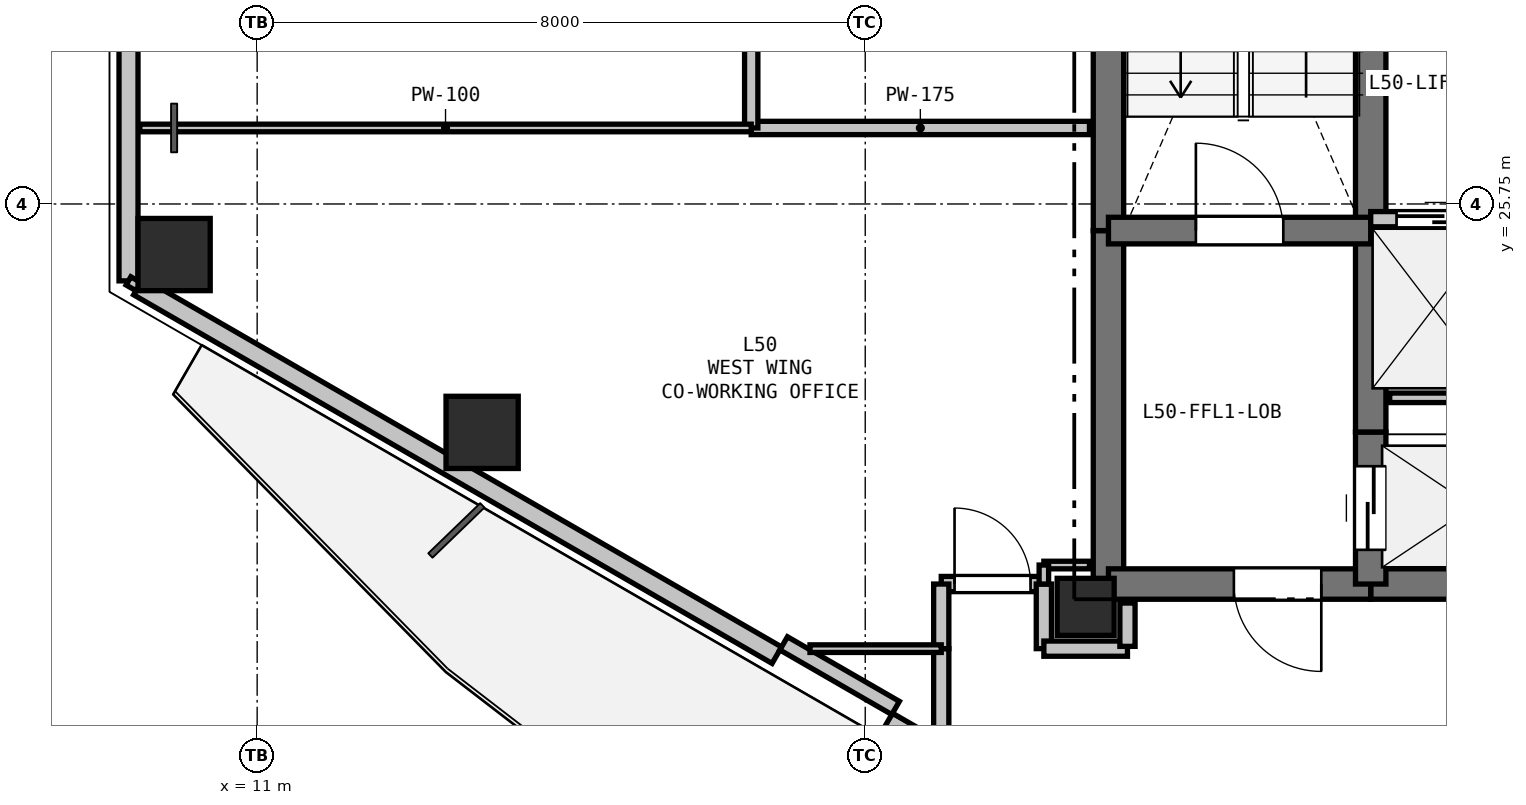
"""IFC4 building model, lengths in metres.
Left out: names, types, materials, properties, quantities, classifications, styles, units other than length and angle.
Written with IfcOpenShell. Run it as: python <this file> out.ifc"""

import sys

from ifc_helpers import new_model, si_unit, direction, frame, frame_2d, origin, origin_2d, place, context, subcontext, project, spatial, rectangle, hollow_rectangle, extrude, element, fill, save


model = new_model("IFC4")
c1 = context("Model", 3, precision=1e-05, world=origin(), true_north=direction((0.0, 1.0)))
c2 = subcontext(c1, "Body", "Model", "MODEL_VIEW")
j1 = project(units=[si_unit("LENGTHUNIT", "METRE"), si_unit("PLANEANGLEUNIT", "RADIAN")], contexts=[c1])
p1 = place(None, origin())
s1 = spatial("IfcSite", under=j1, at=p1, CompositionType="ELEMENT")
p2 = place(p1, origin())
s2 = spatial("IfcBuilding", under=s1, at=p2, CompositionType="ELEMENT")
p3 = place(p2, frame((0.0, 0.0, 182.1)))
s3 = spatial("IfcBuildingStorey", under=s2, at=p3, CompositionType="ELEMENT", Elevation=182.1)
p4 = place(p3, frame((21.9, 20.45, 0.0), z_axis=(0.0, 0.0, 1.0), x_axis=(1.0, 0.0, 0.0)))
e1 = element("IfcColumn", 1, at=p4, inside=s3, PredefinedType="COLUMN", context=c2, shape_type="SweptSolid", body=[
    extrude(rectangle(XDim=0.75, YDim=0.75, at=origin_2d()), origin(), (0.0, 0.0, 1.0), 3.3),
])
for number, where, z_axis, x_axis in (
    (2, (13.96, 22.745, 0.0), (0.0, 0.0, 1.0), (1.0, 0.0, 0.0)),
    (3, (9.907, 25.085, 0.0), (0.0, 0.0, 1.0), (1.0, 0.0, 0.0)),
):
    element("IfcColumn", number, at=place(p3, frame(where, z_axis=z_axis, x_axis=x_axis)), inside=s3, PredefinedType="COLUMN", context=c2, shape_type="SweptSolid", body=[
        extrude(hollow_rectangle(XDim=0.95, YDim=0.95, WallThickness=0.028, at=origin_2d()), origin(), (0.0, 0.0, 1.0), 3.3),
    ])
p5 = place(p3, frame((9.308, 24.738, 0.0), z_axis=(0.0, 0.0, 1.0), x_axis=(0.0, 1.0, 0.0)))
e4 = element("IfcWall", 4, at=p5, inside=s3, PredefinedType="SOLIDWALL", context=c2, shape_type="SweptSolid", body=[
    extrude(rectangle(XDim=4.023, YDim=0.25, at=frame_2d((2.012, 0.0))), origin(), (0.0, 0.0, 1.0), 2.69),
])
p6 = place(p3, frame((27.102, 14.464, 0.0), z_axis=(0.0, 0.0, 1.0), x_axis=(-0.866020680503, 0.500008180874, 0.0)))
e5 = element("IfcWall", 5, at=p6, inside=s3, PredefinedType="PARAPET", context=c2, shape_type="SweptSolid", body=[
    extrude(rectangle(XDim=8.999, YDim=0.2, at=frame_2d((4.5, 0.0))), origin(), (0.0, 0.0, 1.0), 0.2),
])
p7 = place(p3, frame((17.837, 19.814, 0.0), z_axis=(0.0, 0.0, 1.0), x_axis=(-0.866027133173, 0.499997004599, 0.0)))
e6 = element("IfcWall", 6, at=p7, inside=s3, PredefinedType="SOLIDWALL", context=c2, shape_type="SweptSolid", body=[
    extrude(rectangle(XDim=9.699, YDim=0.25, at=frame_2d((4.849, 0.0))), origin(), (0.0, 0.0, 1.0), 2.69),
])
p8 = place(p3, frame((19.399, 19.12, 0.0), z_axis=(0.0, 0.0, 1.0), x_axis=(-0.86605165483, 0.499954529098, 0.0)))
e7 = element("IfcWall", 7, at=p8, inside=s3, PredefinedType="PARAPET", context=c2, shape_type="SweptSolid", body=[
    extrude(rectangle(XDim=1.7, YDim=0.2, at=frame_2d((0.85, 0.0))), origin(), (0.0, 0.0, 1.0), 2.69),
])
p9 = place(p3, frame((22.2, 20.75, 0.0), z_axis=(0.0, 0.0, 1.0), x_axis=(0.0, 1.0, 0.0)))
e8 = element("IfcWall", 8, at=p9, inside=s3, PredefinedType="SHEAR", context=c2, shape_type="SweptSolid", body=[
    extrude(rectangle(XDim=4.65, YDim=0.4, at=frame_2d((2.325, 0.0))), origin(), (0.0, 0.0, 1.0), 3.07),
])
p10 = place(p3, frame((22.2, 25.4, 0.0), z_axis=(0.0, 0.0, 1.0), x_axis=(0.0, 1.0, 0.0)))
e9 = element("IfcWall", 9, at=p10, inside=s3, PredefinedType="SHEAR", context=c2, shape_type="SweptSolid", body=[
    extrude(rectangle(XDim=7.35, YDim=0.4, at=frame_2d((3.675, 0.0))), origin(), (0.0, 0.0, 1.0), 3.07),
])
p11 = place(p3, frame((28.35, 20.75, 0.0), z_axis=(0.0, 0.0, 1.0), x_axis=(-1.0, 0.0, 0.0)))
e10 = element("IfcWall", 10, at=p11, inside=s3, PredefinedType="SHEAR", context=c2, shape_type="SweptSolid", body=[
    extrude(rectangle(XDim=2.7, YDim=0.4, at=frame_2d((1.35, 0.0))), origin(), (0.0, 0.0, 1.0), 3.07),
])
p12 = place(p3, frame((25.65, 20.75, 0.0), z_axis=(0.0, 0.0, 1.0), x_axis=(-1.0, 0.0, 0.0)))
e11 = element("IfcWall", 11, at=p12, inside=s3, PredefinedType="SHEAR", context=c2, shape_type="SweptSolid", body=[
    extrude(rectangle(XDim=3.45, YDim=0.4, at=frame_2d((1.725, 0.0))), origin(), (0.0, 0.0, 1.0), 3.07),
])
p13 = place(p12, frame((0.65, 0.0, 0.0)))
e12 = element("IfcOpeningElement", 12, at=p13, cuts=e11, PredefinedType="OPENING", context=c2, shape_type="SweptSolid", body=[
    extrude(rectangle(XDim=1.15, YDim=2.15, at=frame_2d((0.575, 1.075))), frame((0.0, 0.21, 0.0), z_axis=(0.0, -1.0, 0.0), x_axis=(1.0, 0.0, 0.0)), (0.0, 0.0, 1.0), 0.42),
])
p14 = place(p3, frame((25.65, 20.75, 0.0), z_axis=(0.0, 0.0, 1.0), x_axis=(0.0, 1.0, 0.0)))
e13 = element("IfcWall", 13, at=p14, inside=s3, PredefinedType="SHEAR", context=c2, shape_type="SweptSolid", body=[
    extrude(rectangle(XDim=2.0, YDim=0.4, at=frame_2d((1.0, 0.0))), origin(), (0.0, 0.0, 1.0), 3.07),
])
p15 = place(p14, frame((0.45, 0.0, 0.0)))
e14 = element("IfcOpeningElement", 14, at=p15, cuts=e13, PredefinedType="OPENING", context=c2, shape_type="SweptSolid", body=[
    extrude(rectangle(XDim=1.1, YDim=2.15, at=frame_2d((0.55, 1.075))), frame((0.0, 0.21, 0.0), z_axis=(0.0, -1.0, 0.0), x_axis=(1.0, 0.0, 0.0)), (0.0, 0.0, 1.0), 0.42),
])
p16 = place(p3, frame((25.65, 22.75, 0.0), z_axis=(0.0, 0.0, 1.0), x_axis=(0.0, 1.0, 0.0)))
e15 = element("IfcWall", 15, at=p16, inside=s3, PredefinedType="SHEAR", context=c2, shape_type="SweptSolid", body=[
    extrude(rectangle(XDim=2.8, YDim=0.4, at=frame_2d((1.4, 0.0))), origin(), (0.0, 0.0, 1.0), 3.07),
])
p17 = place(p3, frame((25.65, 25.55, 0.0), z_axis=(0.0, 0.0, 1.0), x_axis=(0.0, 1.0, 0.0)))
e16 = element("IfcWall", 16, at=p17, inside=s3, PredefinedType="SHEAR", context=c2, shape_type="SweptSolid", body=[
    extrude(rectangle(XDim=2.4, YDim=0.4, at=frame_2d((1.2, 0.0))), origin(), (0.0, 0.0, 1.0), 3.07),
])
p18 = place(p3, frame((22.2, 25.4, 0.0), z_axis=(0.0, 0.0, 1.0), x_axis=(1.0, 0.0, 0.0)))
e17 = element("IfcWall", 17, at=p18, inside=s3, PredefinedType="SHEAR", context=c2, shape_type="SweptSolid", body=[
    extrude(rectangle(XDim=3.45, YDim=0.35, at=frame_2d((1.725, 0.0))), origin(), (0.0, 0.0, 1.0), 3.07),
])
p19 = place(p18, frame((1.15, 0.0, 0.0)))
e18 = element("IfcOpeningElement", 18, at=p19, cuts=e17, PredefinedType="OPENING", context=c2, shape_type="SweptSolid", body=[
    extrude(rectangle(XDim=1.15, YDim=2.15, at=frame_2d((0.575, 1.075))), frame((0.0, 0.185, 0.0), z_axis=(0.0, -1.0, 0.0), x_axis=(1.0, 0.0, 0.0)), (0.0, 0.0, 1.0), 0.37),
])
p20 = place(p3, frame((25.65, 25.55, 0.0), z_axis=(0.0, 0.0, 1.0), x_axis=(1.0, 0.0, 0.0)))
e19 = element("IfcWall", 19, at=p20, inside=s3, PredefinedType="PARTITIONING", context=c2, shape_type="SweptSolid", body=[
    extrude(rectangle(XDim=4.95, YDim=0.2, at=frame_2d((2.475, 0.0))), origin(), (0.0, 0.0, 1.0), 3.07),
])
p21 = place(p20, frame((0.34, 0.0, 0.0)))
e20 = element("IfcOpeningElement", 20, at=p21, cuts=e19, PredefinedType="OPENING", context=c2, shape_type="SweptSolid", body=[
    extrude(rectangle(XDim=1.1, YDim=2.15, at=frame_2d((0.55, 1.075))), frame((0.0, 0.11, 0.0), z_axis=(0.0, -1.0, 0.0), x_axis=(1.0, 0.0, 0.0)), (0.0, 0.0, 1.0), 0.22),
])
p22 = place(p20, frame((1.99, 0.0, 0.0)))
e21 = element("IfcOpeningElement", 21, at=p22, cuts=e19, PredefinedType="OPENING", context=c2, shape_type="SweptSolid", body=[
    extrude(rectangle(XDim=1.1, YDim=2.15, at=frame_2d((0.55, 1.075))), frame((0.0, 0.11, 0.0), z_axis=(0.0, -1.0, 0.0), x_axis=(1.0, 0.0, 0.0)), (0.0, 0.0, 1.0), 0.22),
])
p23 = place(p20, frame((3.64, 0.0, 0.0)))
e22 = element("IfcOpeningElement", 22, at=p23, cuts=e19, PredefinedType="OPENING", context=c2, shape_type="SweptSolid", body=[
    extrude(rectangle(XDim=1.1, YDim=2.15, at=frame_2d((0.55, 1.075))), frame((0.0, 0.11, 0.0), z_axis=(0.0, -1.0, 0.0), x_axis=(1.0, 0.0, 0.0)), (0.0, 0.0, 1.0), 0.22),
])
p24 = place(p3, frame((25.9, 23.2, 0.0), z_axis=(0.0, 0.0, 1.0), x_axis=(1.0, 0.0, 0.0)))
e23 = element("IfcWall", 23, at=p24, inside=s3, PredefinedType="PARTITIONING", context=c2, shape_type="SweptSolid", body=[
    extrude(rectangle(XDim=1.4, YDim=0.125, at=frame_2d((0.7, 0.0))), origin(), (0.0, 0.0, 1.0), 3.07),
])
p25 = place(p3, frame((20.0, 20.75, 0.0), z_axis=(0.0, 0.0, 1.0), x_axis=(1.0, 0.0, 0.0)))
e24 = element("IfcWall", 24, at=p25, inside=s3, PredefinedType="PARTITIONING", context=c2, shape_type="SweptSolid", body=[
    extrude(rectangle(XDim=1.35, YDim=0.2, at=frame_2d((0.675, 0.0))), origin(), (0.0, 0.0, 1.0), 2.518),
])
p26 = place(p25, frame((0.175, 0.0, 0.0)))
e25 = element("IfcOpeningElement", 25, at=p26, cuts=e24, PredefinedType="OPENING", context=c2, shape_type="SweptSolid", body=[
    extrude(rectangle(XDim=1.0, YDim=2.15, at=frame_2d((0.5, 1.075))), frame((0.0, 0.11, 0.0), z_axis=(0.0, -1.0, 0.0), x_axis=(1.0, 0.0, 0.0)), (0.0, 0.0, 1.0), 0.22),
])
p27 = place(p3, frame((21.35, 20.75, 0.0), z_axis=(0.0, 0.0, 1.0), x_axis=(0.0, -1.0, 0.0)))
e26 = element("IfcWall", 26, at=p27, inside=s3, PredefinedType="PARTITIONING", context=c2, shape_type="SweptSolid", body=[
    extrude(rectangle(XDim=0.85, YDim=0.2, at=frame_2d((0.425, 0.0))), origin(), (0.0, 0.0, 1.0), 2.518),
])
p28 = place(p3, frame((21.35, 19.9, 0.0), z_axis=(0.0, 0.0, 1.0), x_axis=(1.0, 0.0, 0.0)))
e27 = element("IfcWall", 27, at=p28, inside=s3, PredefinedType="PARTITIONING", context=c2, shape_type="SweptSolid", body=[
    extrude(rectangle(XDim=1.1, YDim=0.2, at=frame_2d((0.55, 0.0))), origin(), (0.0, 0.0, 1.0), 2.518),
])
p29 = place(p3, frame((22.45, 19.93, 0.0), z_axis=(0.0, 0.0, 1.0), x_axis=(0.0, 1.0, 0.0)))
e28 = element("IfcWall", 28, at=p29, inside=s3, PredefinedType="PARTITIONING", context=c2, shape_type="SweptSolid", body=[
    extrude(rectangle(XDim=0.57, YDim=0.2, at=frame_2d((0.285, 0.0))), origin(), (0.0, 0.0, 1.0), 2.518),
])
p30 = place(p3, frame((20.0, 18.609, 0.0), z_axis=(0.0, 0.0, 1.0), x_axis=(0.0, 1.0, 0.0)))
e29 = element("IfcWall", 29, at=p30, inside=s3, PredefinedType="PARTITIONING", context=c2, shape_type="SweptSolid", body=[
    extrude(rectangle(XDim=1.291, YDim=0.2, at=frame_2d((0.646, 0.0))), origin(), (0.0, 0.0, 1.0), 2.365),
])
p31 = place(p3, frame((20.0, 19.9, 0.0), z_axis=(0.0, 0.0, 1.0), x_axis=(0.0, 1.0, 0.0)))
e30 = element("IfcWall", 30, at=p31, inside=s3, PredefinedType="PARTITIONING", context=c2, shape_type="SweptSolid", body=[
    extrude(rectangle(XDim=0.85, YDim=0.2, at=frame_2d((0.425, 0.0))), origin(), (0.0, 0.0, 1.0), 3.07),
])
p32 = place(p3, frame((21.95, 26.75, 0.0), z_axis=(0.0, 0.0, 1.0), x_axis=(-1.0, 0.0, 0.0)))
e31 = element("IfcWall", 31, at=p32, inside=s3, PredefinedType="PLUMBINGWALL", context=c2, shape_type="SweptSolid", body=[
    extrude(rectangle(XDim=4.45, YDim=0.175, at=frame_2d((2.225, 0.0))), origin(), (0.0, 0.0, 1.0), 2.595),
])
p33 = place(p3, frame((17.5, 26.75, 0.0), z_axis=(0.0, 0.0, 1.0), x_axis=(0.0, 1.0, 0.0)))
e32 = element("IfcWall", 32, at=p33, inside=s3, PredefinedType="PLUMBINGWALL", context=c2, shape_type="SweptSolid", body=[
    extrude(rectangle(XDim=6.57, YDim=0.175, at=frame_2d((3.285, 0.0))), origin(), (0.0, 0.0, 1.0), 2.365),
])
p34 = place(p33, frame((2.835, 0.0, 0.0)))
e33 = element("IfcOpeningElement", 33, at=p34, cuts=e32, PredefinedType="OPENING", context=c2, shape_type="SweptSolid", body=[
    extrude(rectangle(XDim=0.9, YDim=2.1, at=frame_2d((0.45, 1.05))), frame((0.0, 0.097, 0.0), z_axis=(0.0, -1.0, 0.0), x_axis=(1.0, 0.0, 0.0)), (0.0, 0.0, 1.0), 0.195),
])
p35 = place(p3, frame((17.5, 26.75, 0.0), z_axis=(0.0, 0.0, 1.0), x_axis=(-1.0, 0.0, 0.0)))
e34 = element("IfcWall", 34, at=p35, inside=s3, PredefinedType="PARTITIONING", context=c2, shape_type="SweptSolid", body=[
    extrude(rectangle(XDim=8.043, YDim=0.1, at=frame_2d((4.022, 0.0))), origin(), (0.0, 0.0, 1.0), 2.734),
])
p36 = place(p3, frame((21.95, 21.0, 0.0), z_axis=(0.0, 0.0, 1.0), x_axis=(-1.0, 0.0, 0.0)))
e35 = element("IfcWall", 35, at=p36, inside=s3, PredefinedType="PARTITIONING", context=c2, shape_type="SweptSolid", body=[
    extrude(rectangle(XDim=0.6, YDim=0.1, at=frame_2d((0.3, 0.0))), origin(), (0.0, 0.0, 1.0), 2.595),
])
p37 = place(p3, frame((21.35, 21.0, 0.0), z_axis=(0.0, 0.0, 1.0), x_axis=(0.0, -1.0, 0.0)))
e36 = element("IfcWall", 36, at=p37, inside=s3, PredefinedType="PARTITIONING", context=c2, shape_type="SweptSolid", body=[
    extrude(rectangle(XDim=0.25, YDim=0.125, at=frame_2d((0.125, 0.0))), origin(), (0.0, 0.0, 1.0), 2.518),
])
p38 = place(p3, frame((20.0, 19.9, 0.0), z_axis=(0.0, 0.0, 1.0), x_axis=(-1.0, 0.0, 0.0)))
e37 = element("IfcWall", 37, at=p38, inside=s3, PredefinedType="PARTITIONING", context=c2, shape_type="SweptSolid", body=[
    extrude(rectangle(XDim=1.727, YDim=0.1, at=frame_2d((0.863, 0.0))), origin(), (0.0, 0.0, 1.0), 2.365),
])
p39 = place(p3, frame((9.437, 24.663, 0.0), z_axis=(0.0, 0.0, 1.0), x_axis=(-0.866239593359, 0.499628829129, 0.0)))
e38 = element("IfcWall", 38, at=p39, inside=s3, PredefinedType="PARTITIONING", context=c2, shape_type="SweptSolid", body=[
    extrude(rectangle(XDim=0.15, YDim=0.125, at=frame_2d((0.075, 0.0))), origin(), (0.0, 0.0, 1.0), 3.07),
])
p40 = place(p21, origin())
e39 = element("IfcDoor", 39, at=p40, inside=s3, OperationType="SLIDING_TO_LEFT", PredefinedType="DOOR", context=c2, shape_type="SweptSolid", body=[
    extrude(rectangle(XDim=1.1, YDim=2.15, at=frame_2d((0.55, 1.075))), frame((0.0, 0.025, 0.0), z_axis=(0.0, -1.0, 0.0), x_axis=(1.0, 0.0, 0.0)), (0.0, 0.0, 1.0), 0.05),
])
fill(e20, e39)
p41 = place(p15, origin())
e40 = element("IfcDoor", 40, at=p41, inside=s3, OperationType="SLIDING_TO_LEFT", PredefinedType="DOOR", context=c2, shape_type="SweptSolid", body=[
    extrude(rectangle(XDim=1.1, YDim=2.15, at=frame_2d((0.55, 1.075))), frame((0.0, 0.025, 0.0), z_axis=(0.0, -1.0, 0.0), x_axis=(1.0, 0.0, 0.0)), (0.0, 0.0, 1.0), 0.05),
])
fill(e14, e40)
p42 = place(p19, origin())
e41 = element("IfcDoor", 41, at=p42, inside=s3, OperationType="SINGLE_SWING_LEFT", PredefinedType="DOOR", context=c2, shape_type="SweptSolid", body=[
    extrude(rectangle(XDim=1.15, YDim=2.15, at=frame_2d((0.575, 1.075))), frame((0.0, 0.025, 0.0), z_axis=(0.0, -1.0, 0.0), x_axis=(1.0, 0.0, 0.0)), (0.0, 0.0, 1.0), 0.05),
])
fill(e18, e41)
p43 = place(p13, origin())
e42 = element("IfcDoor", 42, at=p43, inside=s3, OperationType="SINGLE_SWING_LEFT", PredefinedType="DOOR", context=c2, shape_type="SweptSolid", body=[
    extrude(rectangle(XDim=1.15, YDim=2.15, at=frame_2d((0.575, 1.075))), frame((0.0, 0.025, 0.0), z_axis=(0.0, -1.0, 0.0), x_axis=(1.0, 0.0, 0.0)), (0.0, 0.0, 1.0), 0.05),
])
fill(e12, e42)
p44 = place(p26, origin())
e43 = element("IfcDoor", 43, at=p44, inside=s3, OperationType="SINGLE_SWING_LEFT", PredefinedType="DOOR", context=c2, shape_type="SweptSolid", body=[
    extrude(rectangle(XDim=1.0, YDim=2.15, at=frame_2d((0.5, 1.075))), frame((0.0, 0.025, 0.0), z_axis=(0.0, -1.0, 0.0), x_axis=(1.0, 0.0, 0.0)), (0.0, 0.0, 1.0), 0.05),
])
fill(e25, e43)
save(model, sys.argv[1])
